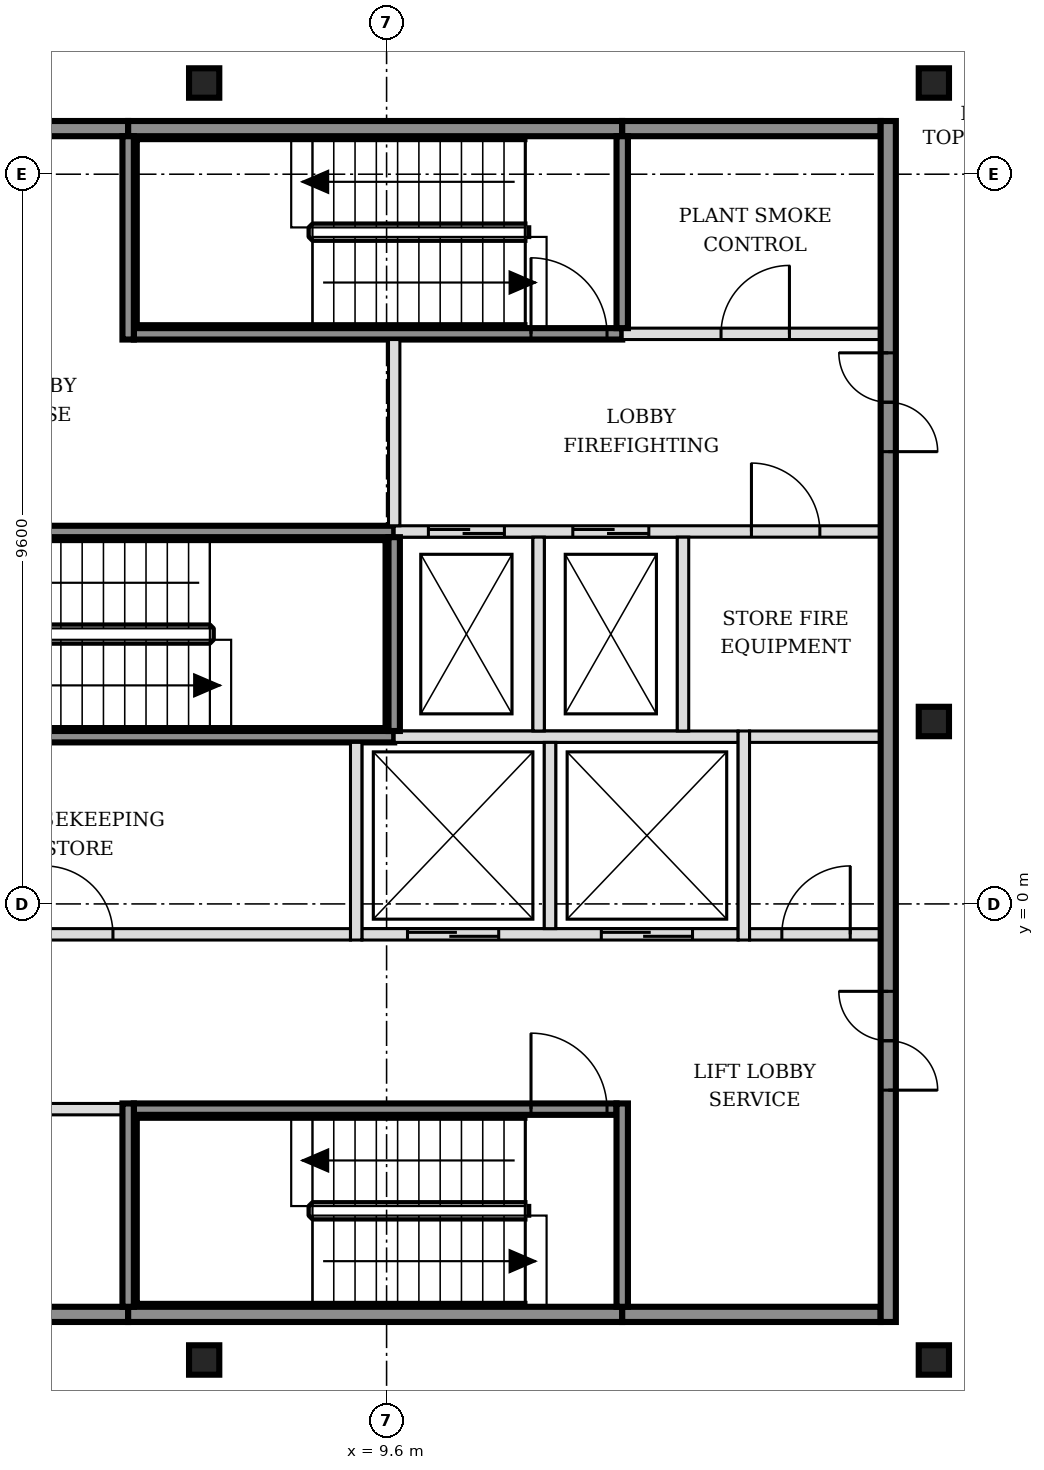
"""IFC4 building model, lengths in metres.
Left out: names, types, materials, properties, quantities, classifications, styles, units other than length and angle.
Written with IfcOpenShell. Run it as: python <this file> out.ifc"""

import sys

from ifc_helpers import new_model, si_unit, direction, frame, frame_2d, origin, origin_2d, place, context, subcontext, project, spatial, rectangle, i_section, extrude, element, fill, save


model = new_model("IFC4")
c1 = context("Model", 3, precision=1e-05, world=origin(), true_north=direction((0.0, 1.0)))
c2 = subcontext(c1, "Body", "Model", "MODEL_VIEW")
j1 = project(units=[si_unit("LENGTHUNIT", "METRE"), si_unit("PLANEANGLEUNIT", "RADIAN")], contexts=[c1])
p1 = place(None, origin())
s1 = spatial("IfcSite", under=j1, at=p1, CompositionType="ELEMENT")
p2 = place(p1, origin())
s2 = spatial("IfcBuilding", under=s1, at=p2, CompositionType="ELEMENT")
p3 = place(p2, frame((0.0, 0.0, 243.0)))
s3 = spatial("IfcBuildingStorey", under=s2, at=p3, CompositionType="ELEMENT", Elevation=243.0)
for number, where, z_axis, x_axis in (
    (1, (7.2, -6.0, -0.15), (0.0, 0.0, 1.0), (1.0, 0.0, 0.0)),
    (2, (16.8, -6.0, -0.15), (0.0, 0.0, 1.0), (1.0, 0.0, 0.0)),
    (3, (16.8, 2.4, -0.15), (0.0, 0.0, 1.0), (1.0, 0.0, 0.0)),
    (4, (7.2, 10.8, -0.15), (0.0, 0.0, 1.0), (1.0, 0.0, 0.0)),
    (5, (16.8, 10.8, -0.15), (0.0, 0.0, 1.0), (1.0, 0.0, 0.0)),
):
    element("IfcColumn", number, at=place(p3, frame(where, z_axis=z_axis, x_axis=x_axis)), inside=s3, PredefinedType="COLUMN", context=c2, shape_type="SweptSolid", body=[
        extrude(i_section(OverallWidth=0.398, OverallDepth=0.387, WebThickness=0.021, FlangeThickness=0.033, FilletRadius=0.015, at=origin_2d()), origin(), (0.0, 0.0, 1.0), 3.6),
    ])
p4 = place(p3, frame((-1.7, -5.4, 0.0), z_axis=(0.0, 0.0, 1.0), x_axis=(1.0, 0.0, 0.0)))
e6 = element("IfcWall", 6, at=p4, inside=s3, PredefinedType="SOLIDWALL", context=c2, shape_type="SweptSolid", body=[
    extrude(rectangle(XDim=7.9, YDim=0.2, at=frame_2d((3.95, 0.0))), origin(), (0.0, 0.0, 1.0), 3.45),
])
p5 = place(p3, frame((6.2, -5.4, 0.0), z_axis=(0.0, 0.0, 1.0), x_axis=(1.0, 0.0, 0.0)))
e7 = element("IfcWall", 7, at=p5, inside=s3, PredefinedType="SOLIDWALL", context=c2, shape_type="SweptSolid", body=[
    extrude(rectangle(XDim=6.5, YDim=0.2, at=frame_2d((3.25, 0.0))), origin(), (0.0, 0.0, 1.0), 3.45),
])
p6 = place(p3, frame((12.7, -5.4, 0.0), z_axis=(0.0, 0.0, 1.0), x_axis=(1.0, 0.0, 0.0)))
e8 = element("IfcWall", 8, at=p6, inside=s3, PredefinedType="SOLIDWALL", context=c2, shape_type="SweptSolid", body=[
    extrude(rectangle(XDim=3.4, YDim=0.2, at=frame_2d((1.7, 0.0))), origin(), (0.0, 0.0, 1.0), 3.45),
])
p7 = place(p3, frame((-1.7, -2.7, 0.0), z_axis=(0.0, 0.0, 1.0), x_axis=(1.0, 0.0, 0.0)))
e9 = element("IfcWall", 9, at=p7, inside=s3, PredefinedType="PARTITIONING", context=c2, shape_type="SweptSolid", body=[
    extrude(rectangle(XDim=7.825, YDim=0.15, at=frame_2d((3.913, 0.0))), origin(), (0.0, 0.0, 1.0), 3.45),
])
p8 = place(p7, frame((3.45, 0.0, 0.0)))
e10 = element("IfcOpeningElement", 10, at=p8, cuts=e9, PredefinedType="OPENING", context=c2, shape_type="SweptSolid", body=[
    extrude(rectangle(XDim=0.9, YDim=2.1, at=frame_2d((0.45, 1.05))), frame((0.0, 0.085, 0.0), z_axis=(0.0, -1.0, 0.0), x_axis=(1.0, 0.0, 0.0)), (0.0, 0.0, 1.0), 0.17),
])
p9 = place(p3, frame((6.275, -2.7, 0.0), z_axis=(0.0, 0.0, 1.0), x_axis=(1.0, 0.0, 0.0)))
e11 = element("IfcWall", 11, at=p9, inside=s3, PredefinedType="SOLIDWALL", context=c2, shape_type="SweptSolid", body=[
    extrude(rectangle(XDim=6.35, YDim=0.15, at=frame_2d((3.175, 0.0))), origin(), (0.0, 0.0, 1.0), 3.45),
])
p10 = place(p9, frame((5.225, 0.0, 0.0)))
e12 = element("IfcOpeningElement", 12, at=p10, cuts=e11, PredefinedType="OPENING", context=c2, shape_type="SweptSolid", body=[
    extrude(rectangle(XDim=1.0, YDim=2.1, at=frame_2d((0.5, 1.05))), frame((0.0, 0.085, 0.0), z_axis=(0.0, -1.0, 0.0), x_axis=(1.0, 0.0, 0.0)), (0.0, 0.0, 1.0), 0.17),
])
p11 = place(p3, frame((-1.7, -0.4, 0.0), z_axis=(0.0, 0.0, 1.0), x_axis=(1.0, 0.0, 0.0)))
e13 = element("IfcWall", 13, at=p11, inside=s3, PredefinedType="PARTITIONING", context=c2, shape_type="SweptSolid", body=[
    extrude(rectangle(XDim=10.825, YDim=0.15, at=frame_2d((5.413, 0.0))), origin(), (0.0, 0.0, 1.0), 3.45),
])
p12 = place(p11, frame((1.3, 0.0, 0.0)))
e14 = element("IfcOpeningElement", 14, at=p12, cuts=e13, PredefinedType="OPENING", context=c2, shape_type="SweptSolid", body=[
    extrude(rectangle(XDim=0.9, YDim=2.1, at=frame_2d((0.45, 1.05))), frame((0.0, 0.085, 0.0), z_axis=(0.0, -1.0, 0.0), x_axis=(1.0, 0.0, 0.0)), (0.0, 0.0, 1.0), 0.17),
])
p13 = place(p11, frame((6.8, 0.0, 0.0)))
e15 = element("IfcOpeningElement", 15, at=p13, cuts=e13, PredefinedType="OPENING", context=c2, shape_type="SweptSolid", body=[
    extrude(rectangle(XDim=0.9, YDim=2.1, at=frame_2d((0.45, 1.05))), frame((0.0, 0.085, 0.0), z_axis=(0.0, -1.0, 0.0), x_axis=(1.0, 0.0, 0.0)), (0.0, 0.0, 1.0), 0.17),
])
p14 = place(p3, frame((9.275, -0.4, 0.0), z_axis=(0.0, 0.0, 1.0), x_axis=(1.0, 0.0, 0.0)))
e16 = element("IfcWall", 16, at=p14, inside=s3, PredefinedType="SOLIDWALL", context=c2, shape_type="SweptSolid", body=[
    extrude(rectangle(XDim=4.95, YDim=0.15, at=frame_2d((2.475, 0.0))), origin(), (0.0, 0.0, 1.0), 3.45),
])
p15 = place(p14, frame((0.6, 0.0, 0.0)))
e17 = element("IfcOpeningElement", 17, at=p15, cuts=e16, PredefinedType="OPENING", context=c2, shape_type="SweptSolid", body=[
    extrude(rectangle(XDim=1.2, YDim=2.1, at=frame_2d((0.6, 1.05))), frame((0.0, 0.085, 0.0), z_axis=(0.0, -1.0, 0.0), x_axis=(1.0, 0.0, 0.0)), (0.0, 0.0, 1.0), 0.17),
])
p16 = place(p14, frame((3.15, 0.0, 0.0)))
e18 = element("IfcOpeningElement", 18, at=p16, cuts=e16, PredefinedType="OPENING", context=c2, shape_type="SweptSolid", body=[
    extrude(rectangle(XDim=1.2, YDim=2.1, at=frame_2d((0.6, 1.05))), frame((0.0, 0.085, 0.0), z_axis=(0.0, -1.0, 0.0), x_axis=(1.0, 0.0, 0.0)), (0.0, 0.0, 1.0), 0.17),
])
p17 = place(p3, frame((14.375, -0.4, 0.0), z_axis=(0.0, 0.0, 1.0), x_axis=(1.0, 0.0, 0.0)))
e19 = element("IfcWall", 19, at=p17, inside=s3, PredefinedType="PARTITIONING", context=c2, shape_type="SweptSolid", body=[
    extrude(rectangle(XDim=1.725, YDim=0.15, at=frame_2d((0.863, 0.0))), origin(), (0.0, 0.0, 1.0), 3.45),
])
p18 = place(p17, frame((0.425, 0.0, 0.0)))
e20 = element("IfcOpeningElement", 20, at=p18, cuts=e19, PredefinedType="OPENING", context=c2, shape_type="SweptSolid", body=[
    extrude(rectangle(XDim=0.9, YDim=2.1, at=frame_2d((0.45, 1.05))), frame((0.0, 0.085, 0.0), z_axis=(0.0, -1.0, 0.0), x_axis=(1.0, 0.0, 0.0)), (0.0, 0.0, 1.0), 0.17),
])
p19 = place(p3, frame((3.2, 2.2, 0.0), z_axis=(0.0, 0.0, 1.0), x_axis=(1.0, 0.0, 0.0)))
e21 = element("IfcWall", 21, at=p19, inside=s3, PredefinedType="SOLIDWALL", context=c2, shape_type="SweptSolid", body=[
    extrude(rectangle(XDim=6.5, YDim=0.15, at=frame_2d((3.25, 0.0))), origin(), (0.0, 0.0, 1.0), 3.45),
])
p20 = place(p3, frame((9.7, 2.2, 0.0), z_axis=(0.0, 0.0, 1.0), x_axis=(1.0, 0.0, 0.0)))
e22 = element("IfcWall", 22, at=p20, inside=s3, PredefinedType="SOLIDWALL", context=c2, shape_type="SweptSolid", body=[
    extrude(rectangle(XDim=4.525, YDim=0.15, at=frame_2d((2.263, 0.0))), origin(), (0.0, 0.0, 1.0), 3.45),
])
p21 = place(p3, frame((14.375, 2.2, 0.0), z_axis=(0.0, 0.0, 1.0), x_axis=(1.0, 0.0, 0.0)))
e23 = element("IfcWall", 23, at=p21, inside=s3, PredefinedType="PARTITIONING", context=c2, shape_type="SweptSolid", body=[
    extrude(rectangle(XDim=1.725, YDim=0.15, at=frame_2d((0.863, 0.0))), origin(), (0.0, 0.0, 1.0), 3.45),
])
p22 = place(p3, frame((3.2, 4.9, 0.0), z_axis=(0.0, 0.0, 1.0), x_axis=(1.0, 0.0, 0.0)))
e24 = element("IfcWall", 24, at=p22, inside=s3, PredefinedType="SOLIDWALL", context=c2, shape_type="SweptSolid", body=[
    extrude(rectangle(XDim=6.5, YDim=0.15, at=frame_2d((3.25, 0.0))), origin(), (0.0, 0.0, 1.0), 3.45),
])
p23 = place(p22, frame((0.175, 0.0, 0.0)))
e25 = element("IfcOpeningElement", 25, at=p23, cuts=e24, PredefinedType="OPENING", context=c2, shape_type="SweptSolid", body=[
    extrude(rectangle(XDim=1.0, YDim=2.1, at=frame_2d((0.5, 1.05))), frame((0.0, 0.085, 0.0), z_axis=(0.0, -1.0, 0.0), x_axis=(1.0, 0.0, 0.0)), (0.0, 0.0, 1.0), 0.17),
])
p24 = place(p3, frame((9.7, 4.9, 0.0), z_axis=(0.0, 0.0, 1.0), x_axis=(1.0, 0.0, 0.0)))
e26 = element("IfcWall", 26, at=p24, inside=s3, PredefinedType="SOLIDWALL", context=c2, shape_type="SweptSolid", body=[
    extrude(rectangle(XDim=6.4, YDim=0.15, at=frame_2d((3.2, 0.0))), origin(), (0.0, 0.0, 1.0), 3.45),
])
p25 = place(p24, frame((0.45, 0.0, 0.0)))
e27 = element("IfcOpeningElement", 27, at=p25, cuts=e26, PredefinedType="OPENING", context=c2, shape_type="SweptSolid", body=[
    extrude(rectangle(XDim=1.0, YDim=2.1, at=frame_2d((0.5, 1.05))), frame((0.0, 0.085, 0.0), z_axis=(0.0, -1.0, 0.0), x_axis=(1.0, 0.0, 0.0)), (0.0, 0.0, 1.0), 0.17),
])
p26 = place(p24, frame((2.35, 0.0, 0.0)))
e28 = element("IfcOpeningElement", 28, at=p26, cuts=e26, PredefinedType="OPENING", context=c2, shape_type="SweptSolid", body=[
    extrude(rectangle(XDim=1.0, YDim=2.1, at=frame_2d((0.5, 1.05))), frame((0.0, 0.085, 0.0), z_axis=(0.0, -1.0, 0.0), x_axis=(1.0, 0.0, 0.0)), (0.0, 0.0, 1.0), 0.17),
])
p27 = place(p24, frame((4.7, 0.0, 0.0)))
e29 = element("IfcOpeningElement", 29, at=p27, cuts=e26, PredefinedType="OPENING", context=c2, shape_type="SweptSolid", body=[
    extrude(rectangle(XDim=0.9, YDim=2.1, at=frame_2d((0.45, 1.05))), frame((0.0, 0.085, 0.0), z_axis=(0.0, -1.0, 0.0), x_axis=(1.0, 0.0, 0.0)), (0.0, 0.0, 1.0), 0.17),
])
p28 = place(p3, frame((6.275, 7.5, 0.0), z_axis=(0.0, 0.0, 1.0), x_axis=(1.0, 0.0, 0.0)))
e30 = element("IfcWall", 30, at=p28, inside=s3, PredefinedType="SOLIDWALL", context=c2, shape_type="SweptSolid", body=[
    extrude(rectangle(XDim=6.425, YDim=0.15, at=frame_2d((3.212, 0.0))), origin(), (0.0, 0.0, 1.0), 3.45),
])
p29 = place(p28, frame((5.225, 0.0, 0.0)))
e31 = element("IfcOpeningElement", 31, at=p29, cuts=e30, PredefinedType="OPENING", context=c2, shape_type="SweptSolid", body=[
    extrude(rectangle(XDim=1.0, YDim=2.1, at=frame_2d((0.5, 1.05))), frame((0.0, 0.085, 0.0), z_axis=(0.0, -1.0, 0.0), x_axis=(1.0, 0.0, 0.0)), (0.0, 0.0, 1.0), 0.17),
])
p30 = place(p3, frame((12.7, 7.5, 0.0), z_axis=(0.0, 0.0, 1.0), x_axis=(1.0, 0.0, 0.0)))
e32 = element("IfcWall", 32, at=p30, inside=s3, PredefinedType="SOLIDWALL", context=c2, shape_type="SweptSolid", body=[
    extrude(rectangle(XDim=3.4, YDim=0.15, at=frame_2d((1.7, 0.0))), origin(), (0.0, 0.0, 1.0), 3.45),
])
p31 = place(p30, frame((1.3, 0.0, 0.0)))
e33 = element("IfcOpeningElement", 33, at=p31, cuts=e32, PredefinedType="OPENING", context=c2, shape_type="SweptSolid", body=[
    extrude(rectangle(XDim=0.9, YDim=2.1, at=frame_2d((0.45, 1.05))), frame((0.0, 0.085, 0.0), z_axis=(0.0, -1.0, 0.0), x_axis=(1.0, 0.0, 0.0)), (0.0, 0.0, 1.0), 0.17),
])
p32 = place(p3, frame((-1.7, 10.2, 0.0), z_axis=(0.0, 0.0, 1.0), x_axis=(1.0, 0.0, 0.0)))
e34 = element("IfcWall", 34, at=p32, inside=s3, PredefinedType="SOLIDWALL", context=c2, shape_type="SweptSolid", body=[
    extrude(rectangle(XDim=7.9, YDim=0.2, at=frame_2d((3.95, 0.0))), origin(), (0.0, 0.0, 1.0), 3.45),
])
p33 = place(p3, frame((6.2, 10.2, 0.0), z_axis=(0.0, 0.0, 1.0), x_axis=(1.0, 0.0, 0.0)))
e35 = element("IfcWall", 35, at=p33, inside=s3, PredefinedType="SOLIDWALL", context=c2, shape_type="SweptSolid", body=[
    extrude(rectangle(XDim=6.5, YDim=0.2, at=frame_2d((3.25, 0.0))), origin(), (0.0, 0.0, 1.0), 3.45),
])
p34 = place(p3, frame((12.7, 10.2, 0.0), z_axis=(0.0, 0.0, 1.0), x_axis=(1.0, 0.0, 0.0)))
e36 = element("IfcWall", 36, at=p34, inside=s3, PredefinedType="SOLIDWALL", context=c2, shape_type="SweptSolid", body=[
    extrude(rectangle(XDim=3.4, YDim=0.2, at=frame_2d((1.7, 0.0))), origin(), (0.0, 0.0, 1.0), 3.45),
])
for number, where, z_axis, x_axis in (
    (37, (6.2, -5.3, 0.0), (0.0, 0.0, 1.0), (0.0, 1.0, 0.0)),
    (38, (6.2, 7.425, 0.0), (0.0, 0.0, 1.0), (0.0, 1.0, 0.0)),
):
    element("IfcWall", number, at=place(p3, frame(where, z_axis=z_axis, x_axis=x_axis)), inside=s3, PredefinedType="SOLIDWALL", context=c2, shape_type="SweptSolid", body=[
        extrude(rectangle(XDim=2.675, YDim=0.15, at=frame_2d((1.337, 0.0))), origin(), (0.0, 0.0, 1.0), 3.45),
    ])
p35 = place(p3, frame((9.2, -0.475, 0.0), z_axis=(0.0, 0.0, 1.0), x_axis=(0.0, 1.0, 0.0)))
e39 = element("IfcWall", 39, at=p35, inside=s3, PredefinedType="SOLIDWALL", context=c2, shape_type="SweptSolid", body=[
    extrude(rectangle(XDim=2.6, YDim=0.15, at=frame_2d((1.3, 0.0))), origin(), (0.0, 0.0, 1.0), 3.45),
])
p36 = place(p3, frame((9.7, 2.275, 0.0), z_axis=(0.0, 0.0, 1.0), x_axis=(0.0, 1.0, 0.0)))
e40 = element("IfcWall", 40, at=p36, inside=s3, PredefinedType="SOLIDWALL", context=c2, shape_type="SweptSolid", body=[
    extrude(rectangle(XDim=2.55, YDim=0.15, at=frame_2d((1.275, 0.0))), origin(), (0.0, 0.0, 1.0), 3.45),
])
p37 = place(p3, frame((9.7, 4.975, 0.0), z_axis=(0.0, 0.0, 1.0), x_axis=(0.0, 1.0, 0.0)))
e41 = element("IfcWall", 41, at=p37, inside=s3, PredefinedType="SOLIDWALL", context=c2, shape_type="SweptSolid", body=[
    extrude(rectangle(XDim=2.45, YDim=0.15, at=frame_2d((1.225, 0.0))), origin(), (0.0, 0.0, 1.0), 3.45),
])
p38 = place(p3, frame((11.6, 2.275, 0.0), z_axis=(0.0, 0.0, 1.0), x_axis=(0.0, 1.0, 0.0)))
e42 = element("IfcWall", 42, at=p38, inside=s3, PredefinedType="SOLIDWALL", context=c2, shape_type="SweptSolid", body=[
    extrude(rectangle(XDim=2.55, YDim=0.15, at=frame_2d((1.275, 0.0))), origin(), (0.0, 0.0, 1.0), 3.45),
])
p39 = place(p3, frame((11.75, -0.325, 0.0), z_axis=(0.0, 0.0, 1.0), x_axis=(0.0, 1.0, 0.0)))
e43 = element("IfcWall", 43, at=p39, inside=s3, PredefinedType="SOLIDWALL", context=c2, shape_type="SweptSolid", body=[
    extrude(rectangle(XDim=2.45, YDim=0.15, at=frame_2d((1.225, 0.0))), origin(), (0.0, 0.0, 1.0), 3.45),
])
p40 = place(p3, frame((12.7, -5.3, 0.0), z_axis=(0.0, 0.0, 1.0), x_axis=(0.0, 1.0, 0.0)))
e44 = element("IfcWall", 44, at=p40, inside=s3, PredefinedType="SOLIDWALL", context=c2, shape_type="SweptSolid", body=[
    extrude(rectangle(XDim=2.675, YDim=0.15, at=frame_2d((1.337, 0.0))), origin(), (0.0, 0.0, 1.0), 3.45),
])
p41 = place(p3, frame((12.7, 7.575, 0.0), z_axis=(0.0, 0.0, 1.0), x_axis=(0.0, 1.0, 0.0)))
e45 = element("IfcWall", 45, at=p41, inside=s3, PredefinedType="SOLIDWALL", context=c2, shape_type="SweptSolid", body=[
    extrude(rectangle(XDim=2.525, YDim=0.15, at=frame_2d((1.263, 0.0))), origin(), (0.0, 0.0, 1.0), 3.45),
])
p42 = place(p3, frame((13.5, 2.275, 0.0), z_axis=(0.0, 0.0, 1.0), x_axis=(0.0, 1.0, 0.0)))
e46 = element("IfcWall", 46, at=p42, inside=s3, PredefinedType="SOLIDWALL", context=c2, shape_type="SweptSolid", body=[
    extrude(rectangle(XDim=2.55, YDim=0.15, at=frame_2d((1.275, 0.0))), origin(), (0.0, 0.0, 1.0), 3.45),
])
p43 = place(p3, frame((14.3, -0.475, 0.0), z_axis=(0.0, 0.0, 1.0), x_axis=(0.0, 1.0, 0.0)))
e47 = element("IfcWall", 47, at=p43, inside=s3, PredefinedType="SOLIDWALL", context=c2, shape_type="SweptSolid", body=[
    extrude(rectangle(XDim=2.75, YDim=0.15, at=frame_2d((1.375, 0.0))), origin(), (0.0, 0.0, 1.0), 3.45),
])
p44 = place(p3, frame((16.2, -5.5, 0.0), z_axis=(0.0, 0.0, 1.0), x_axis=(0.0, 1.0, 0.0)))
e48 = element("IfcWall", 48, at=p44, inside=s3, PredefinedType="SOLIDWALL", context=c2, shape_type="SweptSolid", body=[
    extrude(rectangle(XDim=15.8, YDim=0.2, at=frame_2d((7.9, 0.0))), origin(), (0.0, 0.0, 1.0), 3.45),
])
p45 = place(p44, frame((3.05, 0.0, 0.0)))
e49 = element("IfcOpeningElement", 49, at=p45, cuts=e48, PredefinedType="OPENING", context=c2, shape_type="SweptSolid", body=[
    extrude(rectangle(XDim=1.3, YDim=2.1, at=frame_2d((0.65, 1.05))), frame((0.0, 0.11, 0.0), z_axis=(0.0, -1.0, 0.0), x_axis=(1.0, 0.0, 0.0)), (0.0, 0.0, 1.0), 0.22),
])
p46 = place(p44, frame((11.45, 0.0, 0.0)))
e50 = element("IfcOpeningElement", 50, at=p46, cuts=e48, PredefinedType="OPENING", context=c2, shape_type="SweptSolid", body=[
    extrude(rectangle(XDim=1.3, YDim=2.1, at=frame_2d((0.65, 1.05))), frame((0.0, 0.11, 0.0), z_axis=(0.0, -1.0, 0.0), x_axis=(1.0, 0.0, 0.0)), (0.0, 0.0, 1.0), 0.22),
])
p47 = place(p15, origin())
e51 = element("IfcDoor", 51, at=p47, inside=s3, OperationType="DOUBLE_DOOR_SLIDING", PredefinedType="DOOR", context=c2, shape_type="SweptSolid", body=[
    extrude(rectangle(XDim=1.2, YDim=2.1, at=frame_2d((0.6, 1.05))), frame((0.0, 0.025, 0.0), z_axis=(0.0, -1.0, 0.0), x_axis=(1.0, 0.0, 0.0)), (0.0, 0.0, 1.0), 0.05),
])
fill(e17, e51)
p48 = place(p16, origin())
e52 = element("IfcDoor", 52, at=p48, inside=s3, OperationType="DOUBLE_DOOR_SLIDING", PredefinedType="DOOR", context=c2, shape_type="SweptSolid", body=[
    extrude(rectangle(XDim=1.2, YDim=2.1, at=frame_2d((0.6, 1.05))), frame((0.0, 0.025, 0.0), z_axis=(0.0, -1.0, 0.0), x_axis=(1.0, 0.0, 0.0)), (0.0, 0.0, 1.0), 0.05),
])
fill(e18, e52)
p49 = place(p25, origin())
e53 = element("IfcDoor", 53, at=p49, inside=s3, OperationType="DOUBLE_DOOR_SLIDING", PredefinedType="DOOR", context=c2, shape_type="SweptSolid", body=[
    extrude(rectangle(XDim=1.0, YDim=2.1, at=frame_2d((0.5, 1.05))), frame((0.0, 0.025, 0.0), z_axis=(0.0, -1.0, 0.0), x_axis=(1.0, 0.0, 0.0)), (0.0, 0.0, 1.0), 0.05),
])
fill(e27, e53)
p50 = place(p26, origin())
e54 = element("IfcDoor", 54, at=p50, inside=s3, OperationType="DOUBLE_DOOR_SLIDING", PredefinedType="DOOR", context=c2, shape_type="SweptSolid", body=[
    extrude(rectangle(XDim=1.0, YDim=2.1, at=frame_2d((0.5, 1.05))), frame((0.0, 0.025, 0.0), z_axis=(0.0, -1.0, 0.0), x_axis=(1.0, 0.0, 0.0)), (0.0, 0.0, 1.0), 0.05),
])
fill(e28, e54)
p51 = place(p10, origin())
e55 = element("IfcDoor", 55, at=p51, inside=s3, OperationType="SINGLE_SWING_LEFT", PredefinedType="DOOR", context=c2, shape_type="SweptSolid", body=[
    extrude(rectangle(XDim=1.0, YDim=2.1, at=frame_2d((0.5, 1.05))), frame((0.0, 0.025, 0.0), z_axis=(0.0, -1.0, 0.0), x_axis=(1.0, 0.0, 0.0)), (0.0, 0.0, 1.0), 0.05),
])
fill(e12, e55)
p52 = place(p29, origin())
e56 = element("IfcDoor", 56, at=p52, inside=s3, OperationType="SINGLE_SWING_LEFT", PredefinedType="DOOR", context=c2, shape_type="SweptSolid", body=[
    extrude(rectangle(XDim=1.0, YDim=2.1, at=frame_2d((0.5, 1.05))), frame((0.0, 0.025, 0.0), z_axis=(0.0, -1.0, 0.0), x_axis=(1.0, 0.0, 0.0)), (0.0, 0.0, 1.0), 0.05),
])
fill(e31, e56)
p53 = place(p45, origin())
e57 = element("IfcDoor", 57, at=p53, inside=s3, OperationType="DOUBLE_DOOR_SINGLE_SWING", PredefinedType="DOOR", context=c2, shape_type="SweptSolid", body=[
    extrude(rectangle(XDim=1.3, YDim=2.1, at=frame_2d((0.65, 1.05))), frame((0.0, 0.025, 0.0), z_axis=(0.0, -1.0, 0.0), x_axis=(1.0, 0.0, 0.0)), (0.0, 0.0, 1.0), 0.05),
])
fill(e49, e57)
p54 = place(p46, origin())
e58 = element("IfcDoor", 58, at=p54, inside=s3, OperationType="DOUBLE_DOOR_SINGLE_SWING", PredefinedType="DOOR", context=c2, shape_type="SweptSolid", body=[
    extrude(rectangle(XDim=1.3, YDim=2.1, at=frame_2d((0.65, 1.05))), frame((0.0, 0.025, 0.0), z_axis=(0.0, -1.0, 0.0), x_axis=(1.0, 0.0, 0.0)), (0.0, 0.0, 1.0), 0.05),
])
fill(e50, e58)
p55 = place(p18, origin())
e59 = element("IfcDoor", 59, at=p55, inside=s3, OperationType="SINGLE_SWING_RIGHT", PredefinedType="DOOR", context=c2, shape_type="SweptSolid", body=[
    extrude(rectangle(XDim=0.9, YDim=2.1, at=frame_2d((0.45, 1.05))), frame((0.0, 0.025, 0.0), z_axis=(0.0, -1.0, 0.0), x_axis=(1.0, 0.0, 0.0)), (0.0, 0.0, 1.0), 0.05),
])
fill(e20, e59)
p56 = place(p27, origin())
e60 = element("IfcDoor", 60, at=p56, inside=s3, OperationType="SINGLE_SWING_LEFT", PredefinedType="DOOR", context=c2, shape_type="SweptSolid", body=[
    extrude(rectangle(XDim=0.9, YDim=2.1, at=frame_2d((0.45, 1.05))), frame((0.0, 0.025, 0.0), z_axis=(0.0, -1.0, 0.0), x_axis=(1.0, 0.0, 0.0)), (0.0, 0.0, 1.0), 0.05),
])
fill(e29, e60)
p57 = place(p31, origin())
e61 = element("IfcDoor", 61, at=p57, inside=s3, OperationType="SINGLE_SWING_RIGHT", PredefinedType="DOOR", context=c2, shape_type="SweptSolid", body=[
    extrude(rectangle(XDim=0.9, YDim=2.1, at=frame_2d((0.45, 1.05))), frame((0.0, 0.025, 0.0), z_axis=(0.0, -1.0, 0.0), x_axis=(1.0, 0.0, 0.0)), (0.0, 0.0, 1.0), 0.05),
])
fill(e33, e61)
p58 = place(p13, origin())
e62 = element("IfcDoor", 62, at=p58, inside=s3, OperationType="SINGLE_SWING_LEFT", PredefinedType="DOOR", context=c2, shape_type="SweptSolid", body=[
    extrude(rectangle(XDim=0.9, YDim=2.1, at=frame_2d((0.45, 1.05))), frame((0.0, 0.025, 0.0), z_axis=(0.0, -1.0, 0.0), x_axis=(1.0, 0.0, 0.0)), (0.0, 0.0, 1.0), 0.05),
])
fill(e15, e62)
save(model, sys.argv[1])
